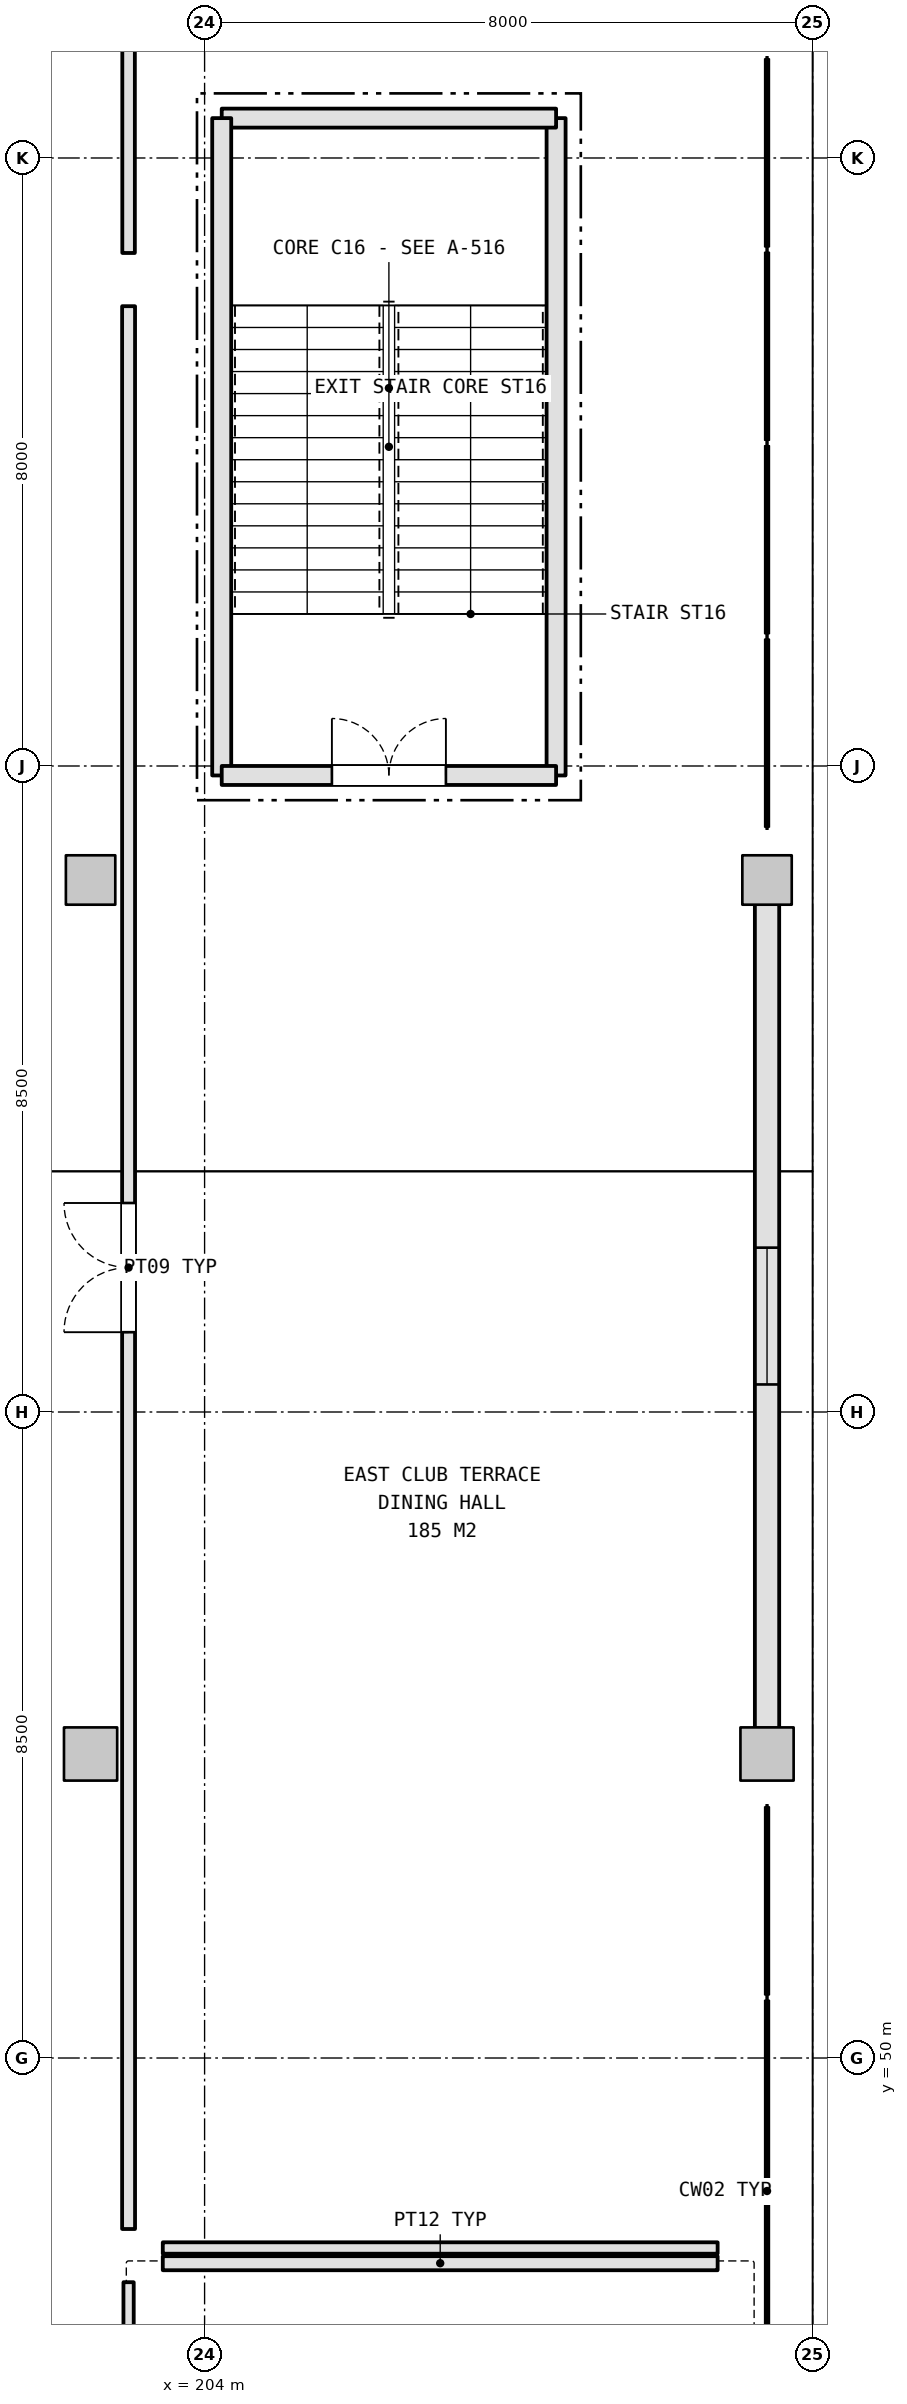
"""IFC4 building model, lengths in metres.
Left out: names, types, materials, properties, quantities, classifications, styles, units other than length and angle.
Written with IfcOpenShell. Run it as: python <this file> out.ifc"""

import sys

from ifc_helpers import new_model, si_unit, direction, frame, frame_2d, origin, origin_2d, place, context, subcontext, project, spatial, rectangle, extrude, element, fill, save


model = new_model("IFC4")
c1 = context("Model", 3, precision=1e-05, world=origin(), true_north=direction((0.0, 1.0)))
c2 = subcontext(c1, "Body", "Model", "MODEL_VIEW")
j1 = project(units=[si_unit("LENGTHUNIT", "METRE"), si_unit("PLANEANGLEUNIT", "RADIAN")], contexts=[c1])
p1 = place(None, origin())
s1 = spatial("IfcSite", under=j1, at=p1, CompositionType="ELEMENT")
p2 = place(p1, origin())
s2 = spatial("IfcBuilding", under=s1, at=p2, CompositionType="ELEMENT")
p3 = place(p2, frame((0.0, 0.0, 10.8)))
s3 = spatial("IfcBuildingStorey", under=s2, at=p3, CompositionType="ELEMENT", Elevation=10.8)
p4 = place(p3, frame((202.5, 54.0, 0.0), z_axis=(0.0, 0.0, 1.0), x_axis=(1.0, 0.0, 0.0)))
e1 = element("IfcColumn", 1, at=p4, inside=s3, PredefinedType="COLUMN", context=c2, shape_type="SweptSolid", body=[
    extrude(rectangle(XDim=0.7, YDim=0.7, at=origin_2d()), origin(), (0.0, 0.0, 1.0), 5.4),
])
p5 = place(p3, frame((202.5, 65.5, 0.0), z_axis=(0.0, 0.0, 1.0), x_axis=(1.0, 0.0, 0.0)))
e2 = element("IfcColumn", 2, at=p5, inside=s3, PredefinedType="COLUMN", context=c2, shape_type="SweptSolid", body=[
    extrude(rectangle(XDim=0.65, YDim=0.65, at=origin_2d()), origin(), (0.0, 0.0, 1.0), 5.4),
])
p6 = place(p3, frame((211.4, 54.0, 0.0), z_axis=(0.0, 0.0, 1.0), x_axis=(1.0, 0.0, 0.0)))
e3 = element("IfcColumn", 3, at=p6, inside=s3, PredefinedType="COLUMN", context=c2, shape_type="SweptSolid", body=[
    extrude(rectangle(XDim=0.7, YDim=0.7, at=origin_2d()), origin(), (0.0, 0.0, 1.0), 5.4),
])
p7 = place(p3, frame((211.4, 65.5, 0.0), z_axis=(0.0, 0.0, 1.0), x_axis=(1.0, 0.0, 0.0)))
e4 = element("IfcColumn", 4, at=p7, inside=s3, PredefinedType="COLUMN", context=c2, shape_type="SweptSolid", body=[
    extrude(rectangle(XDim=0.65, YDim=0.65, at=origin_2d()), origin(), (0.0, 0.0, 1.0), 5.4),
])
p8 = place(p3, frame((211.4, 54.338, 0.0), z_axis=(0.0, 0.0, 1.0), x_axis=(0.0, 1.0, 0.0)))
e5 = element("IfcWall", 5, at=p8, inside=s3, PredefinedType="SOLIDWALL", context=c2, shape_type="SweptSolid", body=[
    extrude(rectangle(XDim=10.849, YDim=0.32, at=frame_2d((5.425, 0.0))), origin(), (0.0, 0.0, 1.0), 4.455),
])
p9 = place(p8, frame((4.524, 0.0, 1.2)))
e6 = element("IfcOpeningElement", 6, at=p9, cuts=e5, PredefinedType="OPENING", context=c2, shape_type="SweptSolid", body=[
    extrude(rectangle(XDim=1.8, YDim=1.6, at=frame_2d((0.9, 0.8))), frame((0.0, 0.17, 0.0), z_axis=(0.0, -1.0, 0.0), x_axis=(1.0, 0.0, 0.0)), (0.0, 0.0, 1.0), 0.34),
])
p10 = place(p3, frame((208.625, 66.875, 0.0), z_axis=(0.0, 0.0, 1.0), x_axis=(0.0, 1.0, 0.0)))
e7 = element("IfcWall", 7, at=p10, inside=s3, PredefinedType="SHEAR", context=c2, shape_type="SweptSolid", body=[
    extrude(rectangle(XDim=8.649, YDim=0.25, at=frame_2d((4.325, 0.0))), origin(), (0.0, 0.0, 1.0), 5.15),
])
p11 = place(p3, frame((208.625, 75.525, 0.0), z_axis=(0.0, 0.0, 1.0), x_axis=(-1.0, 0.0, 0.0)))
e8 = element("IfcWall", 8, at=p11, inside=s3, PredefinedType="SHEAR", context=c2, shape_type="SweptSolid", body=[
    extrude(rectangle(XDim=4.399, YDim=0.25, at=frame_2d((2.2, 0.0))), origin(), (0.0, 0.0, 1.0), 5.15),
])
p12 = place(p3, frame((204.225, 75.525, 0.0), z_axis=(0.0, 0.0, 1.0), x_axis=(0.0, -1.0, 0.0)))
e9 = element("IfcWall", 9, at=p12, inside=s3, PredefinedType="SHEAR", context=c2, shape_type="SweptSolid", body=[
    extrude(rectangle(XDim=8.649, YDim=0.25, at=frame_2d((4.325, 0.0))), origin(), (0.0, 0.0, 1.0), 5.15),
])
p13 = place(p3, frame((204.225, 66.875, 0.0), z_axis=(0.0, 0.0, 1.0), x_axis=(1.0, 0.0, 0.0)))
e10 = element("IfcWall", 10, at=p13, inside=s3, PredefinedType="SHEAR", context=c2, shape_type="SweptSolid", body=[
    extrude(rectangle(XDim=4.399, YDim=0.25, at=frame_2d((2.2, 0.0))), origin(), (0.0, 0.0, 1.0), 5.15),
])
p14 = place(p13, frame((1.45, 0.0, 0.0)))
e11 = element("IfcOpeningElement", 11, at=p14, cuts=e10, PredefinedType="OPENING", context=c2, shape_type="SweptSolid", body=[
    extrude(rectangle(XDim=1.5, YDim=2.2, at=frame_2d((0.75, 1.1))), frame((0.0, 0.135, 0.0), z_axis=(0.0, -1.0, 0.0), x_axis=(1.0, 0.0, 0.0)), (0.0, 0.0, 1.0), 0.27),
])
p15 = place(p3, frame((203.0, 19.75, 0.0), z_axis=(0.0, 0.0, 1.0), x_axis=(0.0, 1.0, 0.0)))
e12 = element("IfcWall", 12, at=p15, inside=s3, PredefinedType="PARTITIONING", context=c2, shape_type="SweptSolid", body=[
    extrude(rectangle(XDim=27.3, YDim=0.135, at=frame_2d((13.65, 0.0))), origin(), (0.0, 0.0, 1.0), 4.605),
])
p16 = place(p15, frame((13.175, 0.0, 0.0)))
e13 = element("IfcOpeningElement", 13, at=p16, cuts=e12, PredefinedType="OPENING", context=c2, shape_type="SweptSolid", body=[
    extrude(rectangle(XDim=0.95, YDim=2.15, at=frame_2d((0.475, 1.075))), frame((0.0, 0.077, 0.0), z_axis=(0.0, -1.0, 0.0), x_axis=(1.0, 0.0, 0.0)), (0.0, 0.0, 1.0), 0.155),
])
p17 = place(p3, frame((203.45, 47.3, 0.0), z_axis=(0.0, 0.0, 1.0), x_axis=(1.0, 0.0, 0.0)))
e14 = element("IfcWall", 14, at=p17, inside=s3, PredefinedType="PARTITIONING", context=c2, shape_type="SweptSolid", body=[
    extrude(rectangle(XDim=7.3, YDim=0.185, at=frame_2d((3.65, 0.0))), origin(), (0.0, 0.0, 1.0), 5.12),
])
p18 = place(p3, frame((203.0, 47.75, 0.0), z_axis=(0.0, 0.0, 1.0), x_axis=(0.0, 1.0, 0.0)))
e15 = element("IfcWall", 15, at=p18, inside=s3, PredefinedType="PARTITIONING", context=c2, shape_type="SweptSolid", body=[
    extrude(rectangle(XDim=25.3, YDim=0.17, at=frame_2d((12.65, 0.0))), origin(), (0.0, 0.0, 1.0), 4.605),
])
p19 = place(p18, frame((11.8, 0.0, 0.0)))
e16 = element("IfcOpeningElement", 16, at=p19, cuts=e15, PredefinedType="OPENING", context=c2, shape_type="SweptSolid", body=[
    extrude(rectangle(XDim=1.7, YDim=2.25, at=frame_2d((0.85, 1.125))), frame((0.0, 0.095, 0.0), z_axis=(0.0, -1.0, 0.0), x_axis=(1.0, 0.0, 0.0)), (0.0, 0.0, 1.0), 0.19),
])
p20 = place(p3, frame((210.75, 47.5, 0.0), z_axis=(0.0, 0.0, 1.0), x_axis=(-1.0, 0.0, 0.0)))
e17 = element("IfcWall", 17, at=p20, inside=s3, PredefinedType="PARTITIONING", context=c2, shape_type="SweptSolid", body=[
    extrude(rectangle(XDim=7.3, YDim=0.15, at=frame_2d((3.65, 0.0))), origin(), (0.0, 0.0, 1.0), 5.12),
])
p21 = place(p3, frame((203.0, 73.75, 0.0), z_axis=(0.0, 0.0, 1.0), x_axis=(0.0, 1.0, 0.0)))
e18 = element("IfcWall", 18, at=p21, inside=s3, PredefinedType="PARTITIONING", context=c2, shape_type="SweptSolid", body=[
    extrude(rectangle(XDim=23.3, YDim=0.165, at=frame_2d((11.65, 0.0))), origin(), (0.0, 0.0, 1.0), 4.605),
])
p22 = place(p21, frame((10.875, 0.0, 0.0)))
e19 = element("IfcOpeningElement", 19, at=p22, cuts=e18, PredefinedType="OPENING", context=c2, shape_type="SweptSolid", body=[
    extrude(rectangle(XDim=1.55, YDim=2.15, at=frame_2d((0.775, 1.075))), frame((0.0, 0.093, 0.0), z_axis=(0.0, -1.0, 0.0), x_axis=(1.0, 0.0, 0.0)), (0.0, 0.0, 1.0), 0.185),
])
p23 = place(p9, origin())
e20 = element("IfcWindow", 20, at=p23, inside=s3, PartitioningType="SINGLE_PANEL", PredefinedType="WINDOW", context=c2, shape_type="SweptSolid", body=[
    extrude(rectangle(XDim=1.8, YDim=1.6, at=frame_2d((0.9, 0.8))), frame((0.0, 0.03, 0.0), z_axis=(0.0, -1.0, 0.0), x_axis=(1.0, 0.0, 0.0)), (0.0, 0.0, 1.0), 0.06),
])
fill(e6, e20)
p24 = place(p14, origin())
e21 = element("IfcDoor", 21, at=p24, inside=s3, OperationType="DOUBLE_DOOR_SINGLE_SWING", PredefinedType="DOOR", context=c2, shape_type="SweptSolid", body=[
    extrude(rectangle(XDim=1.5, YDim=2.2, at=frame_2d((0.75, 1.1))), frame((0.0, 0.025, 0.0), z_axis=(0.0, -1.0, 0.0), x_axis=(1.0, 0.0, 0.0)), (0.0, 0.0, 1.0), 0.05),
])
fill(e11, e21)
p25 = place(p19, origin())
e22 = element("IfcDoor", 22, at=p25, inside=s3, OperationType="DOUBLE_DOOR_SINGLE_SWING", PredefinedType="DOOR", context=c2, shape_type="SweptSolid", body=[
    extrude(rectangle(XDim=1.7, YDim=2.25, at=frame_2d((0.85, 1.125))), frame((0.0, 0.025, 0.0), z_axis=(0.0, -1.0, 0.0), x_axis=(1.0, 0.0, 0.0)), (0.0, 0.0, 1.0), 0.05),
])
fill(e16, e22)
save(model, sys.argv[1])
